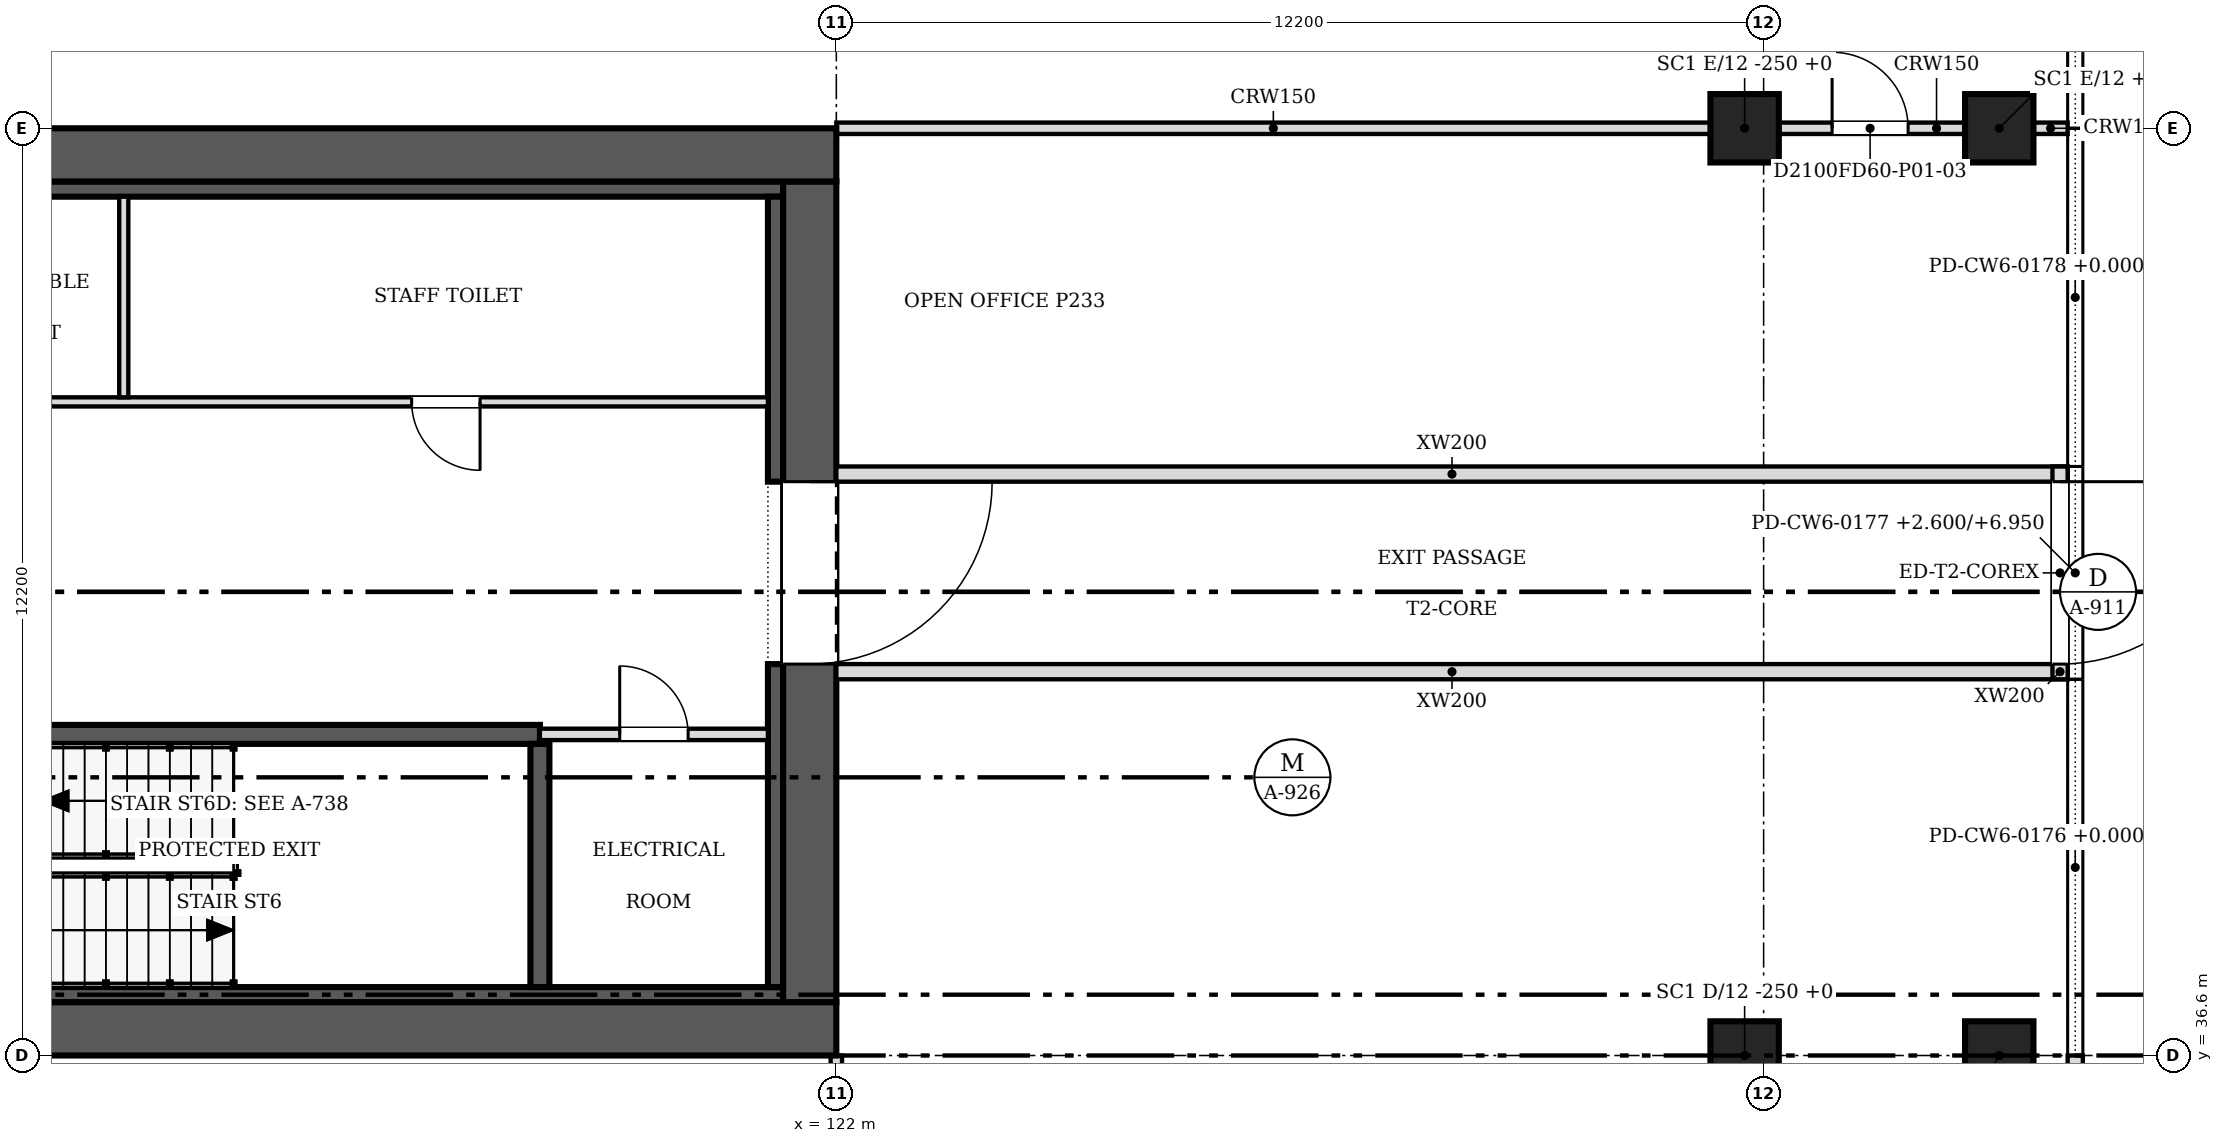
"""IFC4 building model, lengths in metres.
Left out: names, types, materials, properties, quantities, classifications, styles, units other than length and angle.
Written with IfcOpenShell. Run it as: python <this file> out.ifc"""

import sys

from ifc_helpers import new_model, si_unit, direction, frame, frame_2d, origin, origin_2d, place, context, subcontext, project, spatial, polyline, rectangle, outline, extrude, source, transform, mapped, element, fill, save


model = new_model("IFC4")
c1 = context("Model", 3, precision=1e-05, world=origin(), true_north=direction((0.0, 1.0)))
c2 = subcontext(c1, "Body", "Model", "MODEL_VIEW")
j1 = project(units=[si_unit("LENGTHUNIT", "METRE"), si_unit("PLANEANGLEUNIT", "RADIAN")], contexts=[c1])
p1 = place(None, origin())
s1 = spatial("IfcSite", under=j1, at=p1, CompositionType="ELEMENT")
p2 = place(p1, origin())
s2 = spatial("IfcBuilding", under=s1, at=p2, CompositionType="ELEMENT")
p3 = place(p2, origin())
s3 = spatial("IfcBuildingStorey", under=s2, at=p3, CompositionType="ELEMENT", Elevation=0.0)
for number, where, z_axis, x_axis in (
    (1, (133.95, 36.6, 0.0), (0.0, 0.0, 1.0), (1.0, 0.0, 0.0)),
    (2, (133.95, 48.8, 0.0), (0.0, 0.0, 1.0), (1.0, 0.0, 0.0)),
    (3, (137.3, 48.8, 0.0), (0.0, 0.0, 1.0), (1.0, 0.0, 0.0)),
    (4, (137.3, 36.6, 0.0), (0.0, 0.0, 1.0), (1.0, 0.0, 0.0)),
):
    element("IfcColumn", number, at=place(p3, frame(where, z_axis=z_axis, x_axis=x_axis)), inside=s3, PredefinedType="COLUMN", context=c2, shape_type="SweptSolid", body=[
        extrude(rectangle(XDim=0.9, YDim=0.9, at=origin_2d()), origin(), (0.0, 0.0, 1.0), 6.95),
    ])
p4 = place(p3, frame((138.3, 30.5, 0.0), z_axis=(0.0, 0.0, 1.0), x_axis=(0.0, 1.0, 0.0)))
e5 = element("IfcWall", 5, at=p4, inside=s3, PredefinedType="PARTITIONING", context=c2, shape_type="SweptSolid", body=[
    extrude(rectangle(XDim=6.1, YDim=0.2, at=frame_2d((3.05, 0.0))), origin(), (0.0, 0.0, 1.0), 6.95),
])
m1 = source(origin(), c2, "Body", "SweptSolid", [
    extrude(rectangle(XDim=1.8, YDim=3.0, at=frame_2d((0.9, 1.5))), frame((0.0, 0.11, 0.0), z_axis=(0.0, -1.0, 0.0), x_axis=(1.0, 0.0, 0.0)), (0.0, 0.0, 1.0), 0.22),
])
p5 = place(p4, frame((2.15, 0.0, 0.0)))
e6 = element("IfcOpeningElement", 6, at=p5, cuts=e5, PredefinedType="OPENING", context=c2, shape_type="MappedRepresentation", body=[
    mapped(m1, transform((0.0, 0.0, 0.0), scale=1.0)),
])
m2 = source(origin(), c2, "Body", "SweptSolid", [
    extrude(outline(polyline([(0.12, 0.1), (2.03, 0.1), (2.03, 6.85), (0.12, 6.85), (0.12, 0.1)])), frame((0.0, 0.11, 0.0), z_axis=(0.0, -1.0, 0.0), x_axis=(1.0, 0.0, 0.0)), (0.0, 0.0, 1.0), 0.22),
])
p6 = place(p4, origin())
e7 = element("IfcOpeningElement", 7, at=p6, cuts=e5, PredefinedType="OPENING", context=c2, shape_type="MappedRepresentation", body=[
    mapped(m2, transform((0.0, 0.0, 0.0), scale=1.0)),
])
m3 = source(origin(), c2, "Body", "SweptSolid", [
    extrude(outline(polyline([(4.07, 0.1), (5.98, 0.1), (5.98, 6.85), (4.07, 6.85), (4.07, 0.1)])), frame((0.0, 0.11, 0.0), z_axis=(0.0, -1.0, 0.0), x_axis=(1.0, 0.0, 0.0)), (0.0, 0.0, 1.0), 0.22),
])
p7 = place(p4, origin())
e8 = element("IfcOpeningElement", 8, at=p7, cuts=e5, PredefinedType="OPENING", context=c2, shape_type="MappedRepresentation", body=[
    mapped(m3, transform((0.0, 0.0, 0.0), scale=1.0)),
])
m4 = source(origin(), c2, "Body", "SweptSolid", [
    extrude(outline(polyline([(2.15, 3.12), (3.95, 3.12), (3.95, 6.85), (2.15, 6.85), (2.15, 3.12)])), frame((0.0, 0.11, 0.0), z_axis=(0.0, -1.0, 0.0), x_axis=(1.0, 0.0, 0.0)), (0.0, 0.0, 1.0), 0.22),
])
p8 = place(p4, origin())
e9 = element("IfcOpeningElement", 9, at=p8, cuts=e5, PredefinedType="OPENING", context=c2, shape_type="MappedRepresentation", body=[
    mapped(m4, transform((0.0, 0.0, 0.0), scale=1.0)),
])
for number, where, z_axis, x_axis in (
    (10, (122.0, 36.95, 0.0), (0.0, 0.0, 1.0), (-1.0, 0.0, 0.0)),
    (11, (97.6, 48.45, 0.0), (0.0, 0.0, 1.0), (1.0, 0.0, 0.0)),
):
    element("IfcWall", number, at=place(p3, frame(where, z_axis=z_axis, x_axis=x_axis)), inside=s3, PredefinedType="SHEAR", context=c2, shape_type="SweptSolid", body=[
        extrude(rectangle(XDim=24.4, YDim=0.7, at=frame_2d((12.2, 0.0))), origin(), (0.0, 0.0, 1.0), 7.2),
    ])
p9 = place(p3, frame((121.65, 48.1, 0.0), z_axis=(0.0, 0.0, 1.0), x_axis=(0.0, -1.0, 0.0)))
e12 = element("IfcWall", 12, at=p9, inside=s3, PredefinedType="SHEAR", context=c2, shape_type="SweptSolid", body=[
    extrude(rectangle(XDim=10.8, YDim=0.7, at=frame_2d((5.4, 0.0))), origin(), (0.0, 0.0, 1.0), 7.2),
])
m5 = source(origin(), c2, "Body", "SweptSolid", [
    extrude(rectangle(XDim=2.4, YDim=2.1, at=frame_2d((1.2, 1.05))), frame((0.0, 0.36, 0.0), z_axis=(0.0, -1.0, 0.0), x_axis=(1.0, 0.0, 0.0)), (0.0, 0.0, 1.0), 0.72),
])
p10 = place(p9, frame((3.95, 0.0, 0.0)))
e13 = element("IfcOpeningElement", 13, at=p10, cuts=e12, PredefinedType="OPENING", context=c2, shape_type="MappedRepresentation", body=[
    mapped(m5, transform((0.0, 0.0, 0.0), scale=1.0)),
])
for number, where, z_axis, x_axis in (
    (14, (98.3, 37.4, 0.0), (0.0, 0.0, 1.0), (1.0, 0.0, 0.0)),
    (15, (98.3, 48.0, 0.0), (0.0, 0.0, 1.0), (1.0, 0.0, 0.0)),
):
    element("IfcWall", number, at=place(p3, frame(where, z_axis=z_axis, x_axis=x_axis)), inside=s3, PredefinedType="SOLIDWALL", context=c2, shape_type="SweptSolid", body=[
        extrude(rectangle(XDim=23.0, YDim=0.2, at=frame_2d((11.5, 0.0))), origin(), (0.0, 0.0, 1.0), 7.2),
    ])
p11 = place(p3, frame((121.2, 37.5, 0.0), z_axis=(0.0, 0.0, 1.0), x_axis=(0.0, 1.0, 0.0)))
e16 = element("IfcWall", 16, at=p11, inside=s3, PredefinedType="SOLIDWALL", context=c2, shape_type="SweptSolid", body=[
    extrude(rectangle(XDim=4.25, YDim=0.2, at=frame_2d((2.125, 0.0))), origin(), (0.0, 0.0, 1.0), 7.2),
])
p12 = place(p3, frame((121.2, 44.15, 0.0), z_axis=(0.0, 0.0, 1.0), x_axis=(0.0, 1.0, 0.0)))
e17 = element("IfcWall", 17, at=p12, inside=s3, PredefinedType="SOLIDWALL", context=c2, shape_type="SweptSolid", body=[
    extrude(rectangle(XDim=3.75, YDim=0.2, at=frame_2d((1.875, 0.0))), origin(), (0.0, 0.0, 1.0), 7.2),
])
p13 = place(p3, frame((118.1, 40.825, 0.0), z_axis=(0.0, 0.0, 1.0), x_axis=(-1.0, 0.0, 0.0)))
e18 = element("IfcWall", 18, at=p13, inside=s3, PredefinedType="SOLIDWALL", context=c2, shape_type="SweptSolid", body=[
    extrude(rectangle(XDim=8.05, YDim=0.25, at=frame_2d((4.025, 0.0))), origin(), (0.0, 0.0, 1.0), 7.2),
])
m6 = source(origin(), c2, "Body", "SweptSolid", [
    extrude(rectangle(XDim=1.1, YDim=2.1, at=frame_2d((0.55, 1.05))), frame((0.0, 0.135, 0.0), z_axis=(0.0, -1.0, 0.0), x_axis=(1.0, 0.0, 0.0)), (0.0, 0.0, 1.0), 0.27),
])
p14 = place(p13, frame((6.75, 0.0, 0.0)))
e19 = element("IfcOpeningElement", 19, at=p14, cuts=e18, PredefinedType="OPENING", context=c2, shape_type="MappedRepresentation", body=[
    mapped(m6, transform((0.0, 0.0, 0.0), scale=1.0)),
])
p15 = place(p3, frame((118.1, 37.5, 0.0), z_axis=(0.0, 0.0, 1.0), x_axis=(0.0, 1.0, 0.0)))
e20 = element("IfcWall", 20, at=p15, inside=s3, PredefinedType="SOLIDWALL", context=c2, shape_type="SweptSolid", body=[
    extrude(rectangle(XDim=3.2, YDim=0.25, at=frame_2d((1.6, 0.0))), origin(), (0.0, 0.0, 1.0), 7.2),
])
p16 = place(p3, frame((110.05, 45.2, 0.0), z_axis=(0.0, 0.0, 1.0), x_axis=(1.0, 0.0, 0.0)))
e21 = element("IfcWall", 21, at=p16, inside=s3, PredefinedType="PARTITIONING", context=c2, shape_type="SweptSolid", body=[
    extrude(rectangle(XDim=11.05, YDim=0.12, at=frame_2d((5.525, 0.0))), origin(), (0.0, 0.0, 1.0), 6.95),
])
m7 = source(origin(), c2, "Body", "SweptSolid", [
    extrude(rectangle(XDim=0.9, YDim=2.1, at=frame_2d((0.45, 1.05))), frame((0.0, 0.07, 0.0), z_axis=(0.0, -1.0, 0.0), x_axis=(1.0, 0.0, 0.0)), (0.0, 0.0, 1.0), 0.14),
])
p17 = place(p16, frame((0.712, 0.0, 0.0)))
e22 = element("IfcOpeningElement", 22, at=p17, cuts=e21, PredefinedType="OPENING", context=c2, shape_type="MappedRepresentation", body=[
    mapped(m7, transform((0.0, 0.0, 0.0), scale=1.0)),
])
p18 = place(p16, frame((6.363, 0.0, 0.0)))
e23 = element("IfcOpeningElement", 23, at=p18, cuts=e21, PredefinedType="OPENING", context=c2, shape_type="MappedRepresentation", body=[
    mapped(m7, transform((0.0, 0.0, 0.0), scale=1.0)),
])
p19 = place(p3, frame((121.1, 40.825, 0.0), z_axis=(0.0, 0.0, 1.0), x_axis=(-1.0, 0.0, 0.0)))
e24 = element("IfcWall", 24, at=p19, inside=s3, PredefinedType="PARTITIONING", context=c2, shape_type="SweptSolid", body=[
    extrude(rectangle(XDim=3.0, YDim=0.15, at=frame_2d((1.5, 0.0))), origin(), (0.0, 0.0, 1.0), 6.95),
])
m8 = source(origin(), c2, "Body", "SweptSolid", [
    extrude(rectangle(XDim=0.9, YDim=2.1, at=frame_2d((0.45, 1.05))), frame((0.0, 0.085, 0.0), z_axis=(0.0, -1.0, 0.0), x_axis=(1.0, 0.0, 0.0)), (0.0, 0.0, 1.0), 0.17),
])
p20 = place(p19, frame((1.05, 0.0, 0.0)))
e25 = element("IfcOpeningElement", 25, at=p20, cuts=e24, PredefinedType="OPENING", context=c2, shape_type="MappedRepresentation", body=[
    mapped(m8, transform((0.0, 0.0, 0.0), scale=1.0)),
])
p21 = place(p3, frame((112.625, 45.26, 0.0), z_axis=(0.0, 0.0, 1.0), x_axis=(0.0, 1.0, 0.0)))
e26 = element("IfcWall", 26, at=p21, inside=s3, PredefinedType="PARTITIONING", context=c2, shape_type="SweptSolid", body=[
    extrude(rectangle(XDim=2.64, YDim=0.12, at=frame_2d((1.32, 0.0))), origin(), (0.0, 0.0, 1.0), 6.95),
])
for number, where, z_axis, x_axis in (
    (27, (122.0, 41.65, 0.0), (0.0, 0.0, 1.0), (1.0, 0.0, 0.0)),
    (28, (122.0, 44.25, 0.0), (0.0, 0.0, 1.0), (1.0, 0.0, 0.0)),
):
    element("IfcWall", number, at=place(p3, frame(where, z_axis=z_axis, x_axis=x_axis)), inside=s3, PredefinedType="PARTITIONING", context=c2, shape_type="SweptSolid", body=[
        extrude(rectangle(XDim=16.2, YDim=0.2, at=frame_2d((8.1, 0.0))), origin(), (0.0, 0.0, 1.0), 6.115),
    ])
p22 = place(p3, frame((138.1, 44.35, 0.0), z_axis=(0.0, 0.0, 1.0), x_axis=(0.0, -1.0, 0.0)))
e29 = element("IfcWall", 29, at=p22, inside=s3, PredefinedType="PARTITIONING", context=c2, shape_type="SweptSolid", body=[
    extrude(rectangle(XDim=2.8, YDim=0.2, at=frame_2d((1.4, 0.0))), origin(), (0.0, 0.0, 1.0), 6.115),
])
m9 = source(origin(), c2, "Body", "SweptSolid", [
    extrude(rectangle(XDim=2.4, YDim=2.1, at=frame_2d((1.2, 1.05))), frame((0.0, 0.11, 0.0), z_axis=(0.0, -1.0, 0.0), x_axis=(1.0, 0.0, 0.0)), (0.0, 0.0, 1.0), 0.22),
])
p23 = place(p22, frame((0.2, 0.0, 0.0)))
e30 = element("IfcOpeningElement", 30, at=p23, cuts=e29, PredefinedType="OPENING", context=c2, shape_type="MappedRepresentation", body=[
    mapped(m9, transform((0.0, 0.0, 0.0), scale=1.0)),
])
p24 = place(p3, frame((122.0, 36.6, 0.0), z_axis=(0.0, 0.0, 1.0), x_axis=(0.0, -1.0, 0.0)))
e31 = element("IfcWall", 31, at=p24, inside=s3, PredefinedType="PARTITIONING", context=c2, shape_type="SweptSolid", body=[
    extrude(rectangle(XDim=11.749, YDim=0.15, at=frame_2d((5.875, 0.0))), origin(), (0.0, 0.0, 1.0), 6.115),
])
m10 = source(origin(), c2, "Body", "SweptSolid", [
    extrude(rectangle(XDim=1.8, YDim=2.1, at=frame_2d((0.9, 1.05))), frame((0.0, 0.085, 0.0), z_axis=(0.0, -1.0, 0.0), x_axis=(1.0, 0.0, 0.0)), (0.0, 0.0, 1.0), 0.17),
])
p25 = place(p24, frame((4.949, 0.0, 0.0)))
e32 = element("IfcOpeningElement", 32, at=p25, cuts=e31, PredefinedType="OPENING", context=c2, shape_type="MappedRepresentation", body=[
    mapped(m10, transform((0.0, 0.0, 0.0), scale=1.0)),
])
p26 = place(p3, frame((122.0, 48.8, 0.0), z_axis=(0.0, 0.0, 1.0), x_axis=(1.0, 0.0, 0.0)))
e33 = element("IfcWall", 33, at=p26, inside=s3, PredefinedType="PARTITIONING", context=c2, shape_type="SweptSolid", body=[
    extrude(rectangle(XDim=11.499, YDim=0.15, at=frame_2d((5.75, 0.0))), origin(), (0.0, 0.0, 1.0), 6.115),
])
p27 = place(p3, frame((136.849, 48.8, 0.0), z_axis=(0.0, 0.0, 1.0), x_axis=(-1.0, 0.0, 0.0)))
e34 = element("IfcWall", 34, at=p27, inside=s3, PredefinedType="PARTITIONING", context=c2, shape_type="SweptSolid", body=[
    extrude(rectangle(XDim=2.448, YDim=0.15, at=frame_2d((1.224, 0.0))), origin(), (0.0, 0.0, 1.0), 6.115),
])
m11 = source(origin(), c2, "Body", "SweptSolid", [
    extrude(rectangle(XDim=1.0, YDim=2.1, at=frame_2d((0.5, 1.05))), frame((0.0, 0.085, 0.0), z_axis=(0.0, -1.0, 0.0), x_axis=(1.0, 0.0, 0.0)), (0.0, 0.0, 1.0), 0.17),
])
p28 = place(p27, frame((0.748, 0.0, 0.0)))
e35 = element("IfcOpeningElement", 35, at=p28, cuts=e34, PredefinedType="OPENING", context=c2, shape_type="MappedRepresentation", body=[
    mapped(m11, transform((0.0, 0.0, 0.0), scale=1.0)),
])
p29 = place(p3, frame((137.751, 48.8, 0.0), z_axis=(0.0, 0.0, 1.0), x_axis=(1.0, 0.0, 0.0)))
e36 = element("IfcWall", 36, at=p29, inside=s3, PredefinedType="PARTITIONING", context=c2, shape_type="SweptSolid", body=[
    extrude(rectangle(XDim=0.449, YDim=0.15, at=frame_2d((0.225, 0.0))), origin(), (0.0, 0.0, 1.0), 6.115),
])
m12 = source(origin(), c2, "Body", "SweptSolid", [
    extrude(rectangle(XDim=2.4, YDim=2.1, at=frame_2d((1.2, 1.05))), frame((0.0, 0.025, 0.0), z_axis=(0.0, -1.0, 0.0), x_axis=(1.0, 0.0, 0.0)), (0.0, 0.0, 1.0), 0.05),
])
p30 = place(p10, origin())
e37 = element("IfcDoor", 37, at=p30, inside=s3, OperationType="SINGLE_SWING_LEFT", PredefinedType="DOOR", context=c2, shape_type="MappedRepresentation", body=[
    mapped(m12, transform((0.0, 0.0, 0.0), scale=1.0)),
])
fill(e13, e37)
m13 = source(origin(), c2, "Body", "SweptSolid", [
    extrude(rectangle(XDim=0.9, YDim=2.1, at=frame_2d((0.45, 1.05))), frame((0.0, 0.025, 0.0), z_axis=(0.0, -1.0, 0.0), x_axis=(1.0, 0.0, 0.0)), (0.0, 0.0, 1.0), 0.05),
])
p31 = place(p18, origin())
e38 = element("IfcDoor", 38, at=p31, inside=s3, OperationType="SINGLE_SWING_RIGHT", PredefinedType="DOOR", context=c2, shape_type="MappedRepresentation", body=[
    mapped(m13, transform((0.0, 0.0, 0.0), scale=1.0)),
])
fill(e23, e38)
p32 = place(p20, origin())
e39 = element("IfcDoor", 39, at=p32, inside=s3, OperationType="SINGLE_SWING_RIGHT", PredefinedType="DOOR", context=c2, shape_type="MappedRepresentation", body=[
    mapped(m13, transform((0.0, 0.0, 0.0), scale=1.0)),
])
fill(e25, e39)
p33 = place(p23, origin())
e40 = element("IfcDoor", 40, at=p33, inside=s3, OperationType="DOUBLE_DOOR_SINGLE_SWING", PredefinedType="DOOR", context=c2, shape_type="MappedRepresentation", body=[
    mapped(m12, transform((0.0, 0.0, 0.0), scale=1.0)),
])
fill(e30, e40)
m14 = source(origin(), c2, "Body", "SweptSolid", [
    extrude(rectangle(XDim=1.0, YDim=2.1, at=frame_2d((0.5, 1.05))), frame((0.0, 0.025, 0.0), z_axis=(0.0, -1.0, 0.0), x_axis=(1.0, 0.0, 0.0)), (0.0, 0.0, 1.0), 0.05),
])
p34 = place(p28, origin())
e41 = element("IfcDoor", 41, at=p34, inside=s3, OperationType="SINGLE_SWING_RIGHT", PredefinedType="DOOR", context=c2, shape_type="MappedRepresentation", body=[
    mapped(m14, transform((0.0, 0.0, 0.0), scale=1.0)),
])
fill(e35, e41)
save(model, sys.argv[1])
